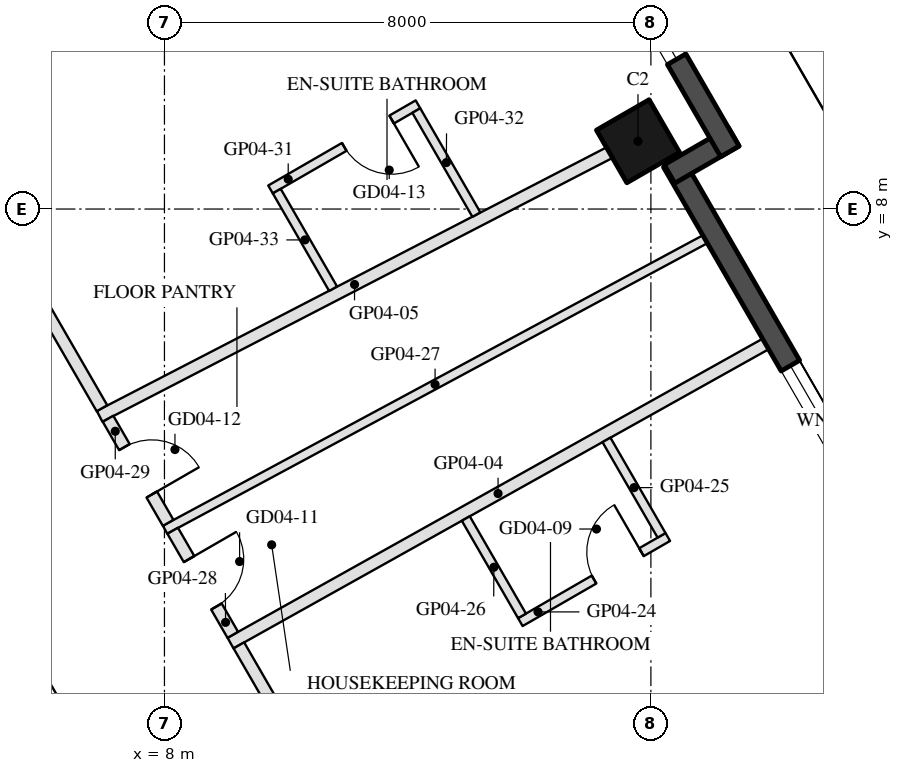
"""IFC4 building model, lengths in metres.
Left out: names, types, materials, properties, quantities, classifications, styles, units other than length and angle.
Written with IfcOpenShell. Run it as: python <this file> out.ifc"""

import sys

from ifc_helpers import new_model, si_unit, direction, frame, frame_2d, origin, origin_2d, place, context, subcontext, project, spatial, rectangle, hollow_rectangle, extrude, element, fill, save


model = new_model("IFC4")
c1 = context("Model", 3, precision=1e-05, world=origin(), true_north=direction((0.0, 1.0)))
c2 = subcontext(c1, "Body", "Model", "MODEL_VIEW")
j1 = project(units=[si_unit("LENGTHUNIT", "METRE"), si_unit("PLANEANGLEUNIT", "RADIAN")], contexts=[c1])
p1 = place(None, origin())
s1 = spatial("IfcSite", under=j1, at=p1, CompositionType="ELEMENT")
p2 = place(p1, origin())
s2 = spatial("IfcBuilding", under=s1, at=p2, CompositionType="ELEMENT")
p3 = place(p2, frame((0.0, 0.0, 72.4)))
s3 = spatial("IfcBuildingStorey", under=s2, at=p3, CompositionType="ELEMENT", Elevation=72.4)
p4 = place(p3, frame((15.788, 9.115, 0.0), z_axis=(0.0, 0.0, 1.0), x_axis=(-0.5, 0.866025403784, 0.0)))
e1 = element("IfcColumn", 1, at=p4, inside=s3, PredefinedType="COLUMN", context=c2, shape_type="SweptSolid", body=[
    extrude(hollow_rectangle(XDim=1.0, YDim=1.0, WallThickness=0.045, at=origin_2d()), origin(), (0.0, 0.0, 1.0), 3.7),
])
p5 = place(p3, frame((19.729, 2.938, 0.0), z_axis=(0.0, 0.0, 1.0), x_axis=(-0.499976430342, 0.866039011305, 0.0)))
e2 = element("IfcWall", 2, at=p5, inside=s3, PredefinedType="SOLIDWALL", context=c2, shape_type="SweptSolid", body=[
    extrude(rectangle(XDim=6.74, YDim=0.35, at=frame_2d((3.37, 0.0))), origin(), (0.0, 0.0, 1.0), 3.55),
])
p6 = place(p5, frame((0.77, 0.0, 0.3)))
e3 = element("IfcOpeningElement", 3, at=p6, cuts=e2, PredefinedType="OPENING", context=c2, shape_type="SweptSolid", body=[
    extrude(rectangle(XDim=2.1, YDim=2.65, at=frame_2d((1.05, 1.325))), frame((0.0, 0.185, 0.0), z_axis=(0.0, -1.0, 0.0), x_axis=(1.0, 0.0, 0.0)), (0.0, 0.0, 1.0), 0.37),
])
p7 = place(p3, frame((16.306, 8.577, 0.0), z_axis=(0.0, 0.0, 1.0), x_axis=(0.866092288191, 0.499884134912, 0.0)))
e4 = element("IfcWall", 4, at=p7, inside=s3, PredefinedType="SOLIDWALL", context=c2, shape_type="SweptSolid", body=[
    extrude(rectangle(XDim=1.22, YDim=0.35, at=frame_2d((0.61, 0.0))), origin(), (0.0, 0.0, 1.0), 3.55),
])
p8 = place(p3, frame((17.299, 8.948, 0.0), z_axis=(0.0, 0.0, 1.0), x_axis=(-0.500010041276, 0.866019606374, 0.0)))
e5 = element("IfcWall", 5, at=p8, inside=s3, PredefinedType="SOLIDWALL", context=c2, shape_type="SweptSolid", body=[
    extrude(rectangle(XDim=9.7, YDim=0.35, at=frame_2d((4.85, 0.0))), origin(), (0.0, 0.0, 1.0), 3.55),
])
p9 = place(p8, frame((1.75, 0.0, 0.3)))
e6 = element("IfcOpeningElement", 6, at=p9, cuts=e5, PredefinedType="OPENING", context=c2, shape_type="SweptSolid", body=[
    extrude(rectangle(XDim=2.4, YDim=2.65, at=frame_2d((1.2, 1.325))), frame((0.0, 0.185, 0.0), z_axis=(0.0, -1.0, 0.0), x_axis=(1.0, 0.0, 0.0)), (0.0, 0.0, 1.0), 0.37),
])
p10 = place(p8, frame((4.949, 0.0, 0.3)))
e7 = element("IfcOpeningElement", 7, at=p10, cuts=e5, PredefinedType="OPENING", context=c2, shape_type="SweptSolid", body=[
    extrude(rectangle(XDim=3.0, YDim=2.65, at=frame_2d((1.5, 1.325))), frame((0.0, 0.185, 0.0), z_axis=(0.0, -1.0, 0.0), x_axis=(1.0, 0.0, 0.0)), (0.0, 0.0, 1.0), 0.37),
])
p11 = place(p3, frame((17.886, 5.78, 0.0), z_axis=(0.0, 0.0, 1.0), x_axis=(-0.872898889426, -0.487901146585, 0.0)))
e8 = element("IfcWall", 8, at=p11, inside=s3, PredefinedType="PARTITIONING", context=c2, shape_type="SweptSolid", body=[
    extrude(rectangle(XDim=10.081, YDim=0.2, at=frame_2d((5.041, 0.0))), origin(), (0.0, 0.0, 1.0), 2.95),
])
p12 = place(p3, frame((15.319, 8.927, 0.0), z_axis=(0.0, 0.0, 1.0), x_axis=(-0.888261672675, -0.459337785139, 0.0)))
e9 = element("IfcWall", 9, at=p12, inside=s3, PredefinedType="PARTITIONING", context=c2, shape_type="SweptSolid", body=[
    extrude(rectangle(XDim=9.44, YDim=0.2, at=frame_2d((4.72, 0.0))), origin(), (0.0, 0.0, 1.0), 2.95),
])
p13 = place(p3, frame((9.224, 0.824, 0.0), z_axis=(0.0, 0.0, 1.0), x_axis=(0.500019749946, -0.866014000848, 0.0)))
e10 = element("IfcWall", 10, at=p13, inside=s3, PredefinedType="PARTITIONING", context=c2, shape_type="SweptSolid", body=[
    extrude(rectangle(XDim=6.09, YDim=0.2, at=frame_2d((3.045, 0.0))), origin(), (0.0, 0.0, 1.0), 2.95),
])
p14 = place(p13, frame((2.545, 0.0, 0.0)))
e11 = element("IfcOpeningElement", 11, at=p14, cuts=e10, PredefinedType="OPENING", context=c2, shape_type="SweptSolid", body=[
    extrude(rectangle(XDim=1.0, YDim=2.1, at=frame_2d((0.5, 1.05))), frame((0.0, 0.11, 0.0), z_axis=(0.0, -1.0, 0.0), x_axis=(1.0, 0.0, 0.0)), (0.0, 0.0, 1.0), 0.22),
])
p15 = place(p3, frame((13.853, 1.206, 0.0), z_axis=(0.0, 0.0, 1.0), x_axis=(0.866056369097, 0.49994636267, 0.0)))
e12 = element("IfcWall", 12, at=p15, inside=s3, PredefinedType="PARTITIONING", context=c2, shape_type="SweptSolid", body=[
    extrude(rectangle(XDim=2.8, YDim=0.15, at=frame_2d((1.4, 0.0))), origin(), (0.0, 0.0, 1.0), 3.55),
])
p16 = place(p15, frame((1.4, 0.0, 0.0)))
e13 = element("IfcOpeningElement", 13, at=p16, cuts=e12, PredefinedType="OPENING", context=c2, shape_type="SweptSolid", body=[
    extrude(rectangle(XDim=0.9, YDim=2.1, at=frame_2d((0.45, 1.05))), frame((0.0, 0.085, 0.0), z_axis=(0.0, -1.0, 0.0), x_axis=(1.0, 0.0, 0.0)), (0.0, 0.0, 1.0), 0.17),
])
p17 = place(p3, frame((16.175, 2.633, 0.0), z_axis=(0.0, 0.0, 1.0), x_axis=(-0.499979029598, 0.866037510713, 0.0)))
e14 = element("IfcWall", 14, at=p17, inside=s3, PredefinedType="PARTITIONING", context=c2, shape_type="SweptSolid", body=[
    extrude(rectangle(XDim=1.812, YDim=0.15, at=frame_2d((0.906, 0.0))), origin(), (0.0, 0.0, 1.0), 2.95),
])
p18 = place(p3, frame((13.88, 1.308, 0.0), z_axis=(0.0, 0.0, 1.0), x_axis=(-0.500015802937, 0.866016279763, 0.0)))
e15 = element("IfcWall", 15, at=p18, inside=s3, PredefinedType="PARTITIONING", context=c2, shape_type="SweptSolid", body=[
    extrude(rectangle(XDim=1.849, YDim=0.15, at=frame_2d((0.925, 0.0))), origin(), (0.0, 0.0, 1.0), 2.95),
])
p19 = place(p3, frame((16.892, 7.503, 0.0), z_axis=(0.0, 0.0, 1.0), x_axis=(-0.88070031641, -0.473673888531, 0.0)))
e16 = element("IfcWall", 16, at=p19, inside=s3, PredefinedType="PARTITIONING", context=c2, shape_type="SweptSolid", body=[
    extrude(rectangle(XDim=10.085, YDim=0.15, at=frame_2d((5.042, 0.0))), origin(), (0.0, 0.0, 1.0), 2.96),
])
p20 = place(p3, frame((8.135, 2.709, 0.0), z_axis=(0.0, 0.0, 1.0), x_axis=(0.499964791386, -0.866045730533, 0.0)))
e17 = element("IfcWall", 17, at=p20, inside=s3, PredefinedType="PARTITIONING", context=c2, shape_type="SweptSolid", body=[
    extrude(rectangle(XDim=1.977, YDim=0.2, at=frame_2d((0.988, 0.0))), origin(), (0.0, 0.0, 1.0), 3.55),
])
p21 = place(p20, frame((0.538, 0.0, 0.0)))
e18 = element("IfcOpeningElement", 18, at=p21, cuts=e17, PredefinedType="OPENING", context=c2, shape_type="SweptSolid", body=[
    extrude(rectangle(XDim=0.9, YDim=2.1, at=frame_2d((0.45, 1.05))), frame((0.0, 0.11, 0.0), z_axis=(0.0, -1.0, 0.0), x_axis=(1.0, 0.0, 0.0)), (0.0, 0.0, 1.0), 0.22),
])
p22 = place(p3, frame((7.072, 4.55, 0.0), z_axis=(0.0, 0.0, 1.0), x_axis=(0.500018274647, -0.866014852655, 0.0)))
e19 = element("IfcWall", 19, at=p22, inside=s3, PredefinedType="PARTITIONING", context=c2, shape_type="SweptSolid", body=[
    extrude(rectangle(XDim=1.977, YDim=0.2, at=frame_2d((0.988, 0.0))), origin(), (0.0, 0.0, 1.0), 2.95),
])
p23 = place(p22, frame((0.538, 0.0, 0.0)))
e20 = element("IfcOpeningElement", 20, at=p23, cuts=e19, PredefinedType="OPENING", context=c2, shape_type="SweptSolid", body=[
    extrude(rectangle(XDim=0.9, YDim=2.1, at=frame_2d((0.45, 1.05))), frame((0.0, 0.11, 0.0), z_axis=(0.0, -1.0, 0.0), x_axis=(1.0, 0.0, 0.0)), (0.0, 0.0, 1.0), 0.22),
])
p24 = place(p3, frame((2.281, 12.85, 0.0), z_axis=(0.0, 0.0, 1.0), x_axis=(0.499986710104, -0.866033076574, 0.0)))
e21 = element("IfcWall", 21, at=p24, inside=s3, PredefinedType="PARTITIONING", context=c2, shape_type="SweptSolid", body=[
    extrude(rectangle(XDim=9.384, YDim=0.2, at=frame_2d((4.692, 0.0))), origin(), (0.0, 0.0, 1.0), 2.95),
])
p25 = place(p24, frame((4.192, 0.0, 0.0)))
e22 = element("IfcOpeningElement", 22, at=p25, cuts=e21, PredefinedType="OPENING", context=c2, shape_type="SweptSolid", body=[
    extrude(rectangle(XDim=1.0, YDim=2.1, at=frame_2d((0.5, 1.05))), frame((0.0, 0.11, 0.0), z_axis=(0.0, -1.0, 0.0), x_axis=(1.0, 0.0, 0.0)), (0.0, 0.0, 1.0), 0.22),
])
p26 = place(p3, frame((12.169, 9.722, 0.0), z_axis=(0.0, 0.0, 1.0), x_axis=(-0.865996816683, -0.500049511043, 0.0)))
e23 = element("IfcWall", 23, at=p26, inside=s3, PredefinedType="PARTITIONING", context=c2, shape_type="SweptSolid", body=[
    extrude(rectangle(XDim=2.8, YDim=0.15, at=frame_2d((1.4, 0.0))), origin(), (0.0, 0.0, 1.0), 3.55),
])
p27 = place(p26, frame((0.5, 0.0, 0.0)))
e24 = element("IfcOpeningElement", 24, at=p27, cuts=e23, PredefinedType="OPENING", context=c2, shape_type="SweptSolid", body=[
    extrude(rectangle(XDim=0.9, YDim=2.1, at=frame_2d((0.45, 1.05))), frame((0.0, 0.085, 0.0), z_axis=(0.0, -1.0, 0.0), x_axis=(1.0, 0.0, 0.0)), (0.0, 0.0, 1.0), 0.17),
])
p28 = place(p3, frame((13.13, 7.908, 0.0), z_axis=(0.0, 0.0, 1.0), x_axis=(-0.500071767444, 0.865983964866, 0.0)))
e25 = element("IfcWall", 25, at=p28, inside=s3, PredefinedType="PARTITIONING", context=c2, shape_type="SweptSolid", body=[
    extrude(rectangle(XDim=1.976, YDim=0.15, at=frame_2d((0.988, 0.0))), origin(), (0.0, 0.0, 1.0), 3.55),
])
p29 = place(p3, frame((10.774, 6.689, 0.0), z_axis=(0.0, 0.0, 1.0), x_axis=(-0.499992292652, 0.866029853578, 0.0)))
e26 = element("IfcWall", 26, at=p29, inside=s3, PredefinedType="PARTITIONING", context=c2, shape_type="SweptSolid", body=[
    extrude(rectangle(XDim=1.854, YDim=0.15, at=frame_2d((0.927, 0.0))), origin(), (0.0, 0.0, 1.0), 3.55),
])
p30 = place(p6, origin())
e27 = element("IfcWindow", 27, at=p30, inside=s3, PartitioningType="SINGLE_PANEL", PredefinedType="WINDOW", context=c2, shape_type="SweptSolid", body=[
    extrude(rectangle(XDim=2.1, YDim=2.65, at=frame_2d((1.05, 1.325))), frame((0.0, 0.03, 0.0), z_axis=(0.0, -1.0, 0.0), x_axis=(1.0, 0.0, 0.0)), (0.0, 0.0, 1.0), 0.06),
])
fill(e3, e27)
p31 = place(p9, origin())
e28 = element("IfcWindow", 28, at=p31, inside=s3, PartitioningType="SINGLE_PANEL", PredefinedType="WINDOW", context=c2, shape_type="SweptSolid", body=[
    extrude(rectangle(XDim=2.4, YDim=2.65, at=frame_2d((1.2, 1.325))), frame((0.0, 0.03, 0.0), z_axis=(0.0, -1.0, 0.0), x_axis=(1.0, 0.0, 0.0)), (0.0, 0.0, 1.0), 0.06),
])
fill(e6, e28)
p32 = place(p16, origin())
e29 = element("IfcDoor", 29, at=p32, inside=s3, OperationType="SINGLE_SWING_RIGHT", PredefinedType="DOOR", context=c2, shape_type="SweptSolid", body=[
    extrude(rectangle(XDim=0.9, YDim=2.1, at=frame_2d((0.45, 1.05))), frame((0.0, 0.025, 0.0), z_axis=(0.0, -1.0, 0.0), x_axis=(1.0, 0.0, 0.0)), (0.0, 0.0, 1.0), 0.05),
])
fill(e13, e29)
p33 = place(p21, origin())
e30 = element("IfcDoor", 30, at=p33, inside=s3, OperationType="SINGLE_SWING_LEFT", PredefinedType="DOOR", context=c2, shape_type="SweptSolid", body=[
    extrude(rectangle(XDim=0.9, YDim=2.1, at=frame_2d((0.45, 1.05))), frame((0.0, 0.025, 0.0), z_axis=(0.0, -1.0, 0.0), x_axis=(1.0, 0.0, 0.0)), (0.0, 0.0, 1.0), 0.05),
])
fill(e18, e30)
p34 = place(p23, origin())
e31 = element("IfcDoor", 31, at=p34, inside=s3, OperationType="SINGLE_SWING_RIGHT", PredefinedType="DOOR", context=c2, shape_type="SweptSolid", body=[
    extrude(rectangle(XDim=0.9, YDim=2.1, at=frame_2d((0.45, 1.05))), frame((0.0, 0.025, 0.0), z_axis=(0.0, -1.0, 0.0), x_axis=(1.0, 0.0, 0.0)), (0.0, 0.0, 1.0), 0.05),
])
fill(e20, e31)
p35 = place(p27, origin())
e32 = element("IfcDoor", 32, at=p35, inside=s3, OperationType="SINGLE_SWING_LEFT", PredefinedType="DOOR", context=c2, shape_type="SweptSolid", body=[
    extrude(rectangle(XDim=0.9, YDim=2.1, at=frame_2d((0.45, 1.05))), frame((0.0, 0.025, 0.0), z_axis=(0.0, -1.0, 0.0), x_axis=(1.0, 0.0, 0.0)), (0.0, 0.0, 1.0), 0.05),
])
fill(e24, e32)
save(model, sys.argv[1])
